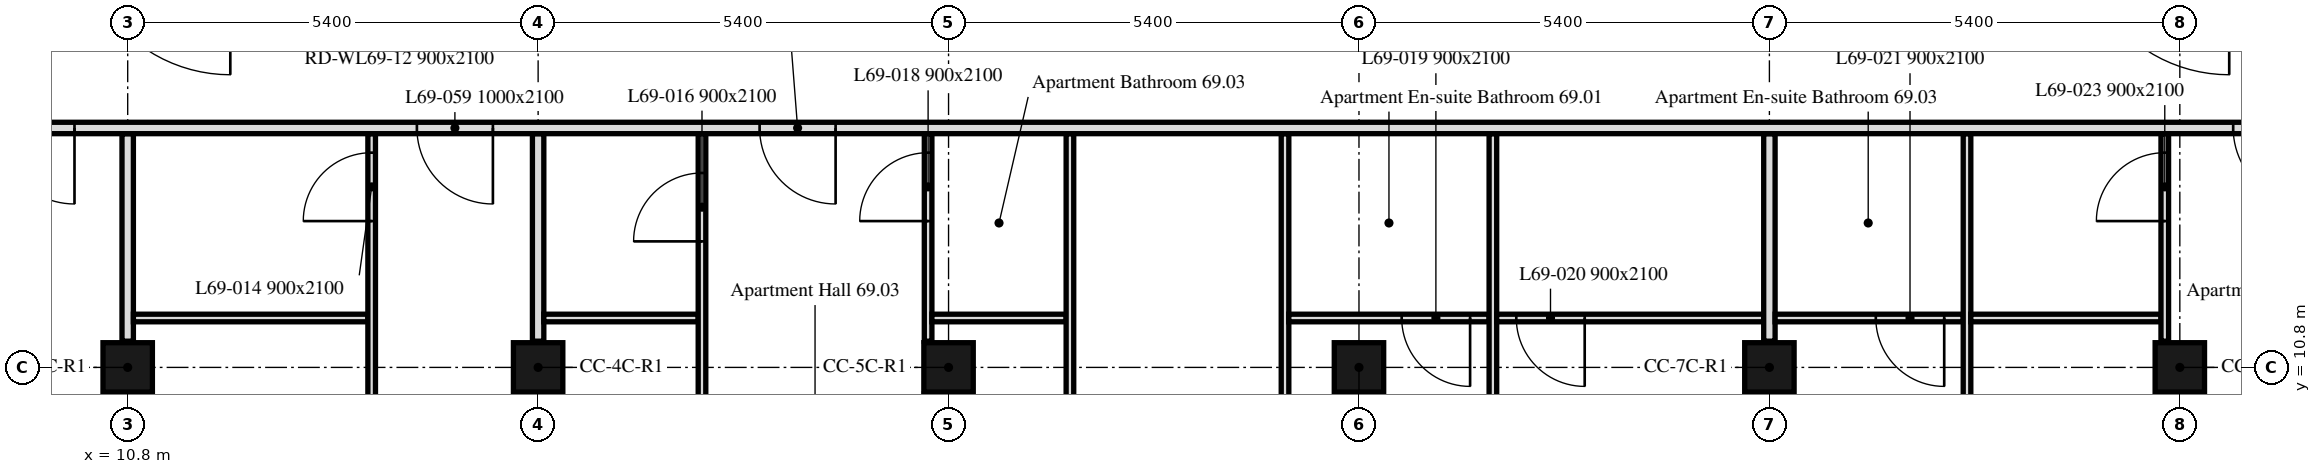
"""IFC4 building model, lengths in metres.
Left out: names, types, materials, properties, quantities, classifications, styles, units other than length and angle.
Written with IfcOpenShell. Run it as: python <this file> out.ifc"""

import sys

from ifc_helpers import new_model, si_unit, direction, frame, frame_2d, origin, origin_2d, place, context, subcontext, project, spatial, rectangle, extrude, element, fill, save


model = new_model("IFC4")
c1 = context("Model", 3, precision=1e-05, world=origin(), true_north=direction((0.0, 1.0)))
c2 = subcontext(c1, "Body", "Model", "MODEL_VIEW")
j1 = project(units=[si_unit("LENGTHUNIT", "METRE"), si_unit("PLANEANGLEUNIT", "RADIAN")], contexts=[c1])
p1 = place(None, origin())
s1 = spatial("IfcSite", under=j1, at=p1, CompositionType="ELEMENT")
p2 = place(p1, origin())
s2 = spatial("IfcBuilding", under=s1, at=p2, CompositionType="ELEMENT")
p3 = place(p2, frame((0.0, 0.0, 281.8)))
s3 = spatial("IfcBuildingStorey", under=s2, at=p3, CompositionType="ELEMENT", Elevation=281.8)
for number, where, z_axis, x_axis in (
    (1, (10.8, 10.8, 0.0), (0.0, 0.0, 1.0), (1.0, 0.0, 0.0)),
    (2, (16.2, 10.8, 0.0), (0.0, 0.0, 1.0), (1.0, 0.0, 0.0)),
    (3, (21.6, 10.8, 0.0), (0.0, 0.0, 1.0), (1.0, 0.0, 0.0)),
    (4, (27.0, 10.8, 0.0), (0.0, 0.0, 1.0), (1.0, 0.0, 0.0)),
    (5, (32.4, 10.8, 0.0), (0.0, 0.0, 1.0), (1.0, 0.0, 0.0)),
    (6, (37.8, 10.8, 0.0), (0.0, 0.0, 1.0), (1.0, 0.0, 0.0)),
):
    element("IfcColumn", number, at=place(p3, frame(where, z_axis=z_axis, x_axis=x_axis)), inside=s3, PredefinedType="COLUMN", context=c2, shape_type="SweptSolid", body=[
        extrude(rectangle(XDim=0.65, YDim=0.65, at=origin_2d()), origin(), (0.0, 0.0, 1.0), 3.0),
    ])
p4 = place(p3, frame((10.8, 5.9, 0.0), z_axis=(0.0, 0.0, 1.0), x_axis=(0.0, 1.0, 0.0)))
e7 = element("IfcWall", 7, at=p4, inside=s3, PredefinedType="PARTITIONING", context=c2, shape_type="SweptSolid", body=[
    extrude(rectangle(XDim=4.555, YDim=0.15, at=frame_2d((2.278, 0.0))), origin(), (0.0, 0.0, 1.0), 3.0),
])
p5 = place(p3, frame((10.8, 11.145, 0.0), z_axis=(0.0, 0.0, 1.0), x_axis=(0.0, 1.0, 0.0)))
e8 = element("IfcWall", 8, at=p5, inside=s3, PredefinedType="PARTITIONING", context=c2, shape_type="SweptSolid", body=[
    extrude(rectangle(XDim=2.73, YDim=0.15, at=frame_2d((1.365, 0.0))), origin(), (0.0, 0.0, 1.0), 3.0),
])
p6 = place(p3, frame((13.96, 11.45, 0.0), z_axis=(0.0, 0.0, 1.0), x_axis=(-1.0, 0.0, 0.0)))
e9 = element("IfcWall", 9, at=p6, inside=s3, PredefinedType="PARTITIONING", context=c2, shape_type="SweptSolid", body=[
    extrude(rectangle(XDim=3.085, YDim=0.1, at=frame_2d((1.542, 0.0))), origin(), (0.0, 0.0, 1.0), 3.0),
])
p7 = place(p3, frame((14.01, 5.9, 0.0), z_axis=(0.0, 0.0, 1.0), x_axis=(0.0, 1.0, 0.0)))
e10 = element("IfcWall", 10, at=p7, inside=s3, PredefinedType="PARTITIONING", context=c2, shape_type="SweptSolid", body=[
    extrude(rectangle(XDim=7.975, YDim=0.1, at=frame_2d((3.988, 0.0))), origin(), (0.0, 0.0, 1.0), 3.0),
])
p8 = place(p7, frame((6.825, 0.0, 0.0)))
e11 = element("IfcOpeningElement", 11, at=p8, cuts=e10, PredefinedType="OPENING", context=c2, shape_type="SweptSolid", body=[
    extrude(rectangle(XDim=0.9, YDim=2.1, at=frame_2d((0.45, 1.05))), frame((0.0, 0.05, 0.0), z_axis=(0.0, -1.0, 0.0), x_axis=(1.0, 0.0, 0.0)), (0.0, 0.0, 1.0), 0.1),
])
p9 = place(p7, frame((2.3, 0.0, 0.0)))
e12 = element("IfcOpeningElement", 12, at=p9, cuts=e10, PredefinedType="OPENING", context=c2, shape_type="SweptSolid", body=[
    extrude(rectangle(XDim=0.9, YDim=2.1, at=frame_2d((0.45, 1.05))), frame((0.0, 0.05, 0.0), z_axis=(0.0, -1.0, 0.0), x_axis=(1.0, 0.0, 0.0)), (0.0, 0.0, 1.0), 0.1),
])
p10 = place(p3, frame((16.2, 5.9, 0.0), z_axis=(0.0, 0.0, 1.0), x_axis=(0.0, 1.0, 0.0)))
e13 = element("IfcWall", 13, at=p10, inside=s3, PredefinedType="PARTITIONING", context=c2, shape_type="SweptSolid", body=[
    extrude(rectangle(XDim=4.555, YDim=0.15, at=frame_2d((2.278, 0.0))), origin(), (0.0, 0.0, 1.0), 2.4),
])
p11 = place(p3, frame((16.2, 11.145, 0.0), z_axis=(0.0, 0.0, 1.0), x_axis=(0.0, 1.0, 0.0)))
e14 = element("IfcWall", 14, at=p11, inside=s3, PredefinedType="PARTITIONING", context=c2, shape_type="SweptSolid", body=[
    extrude(rectangle(XDim=2.73, YDim=0.15, at=frame_2d((1.365, 0.0))), origin(), (0.0, 0.0, 1.0), 2.4),
])
p12 = place(p3, frame((18.306, 11.45, 0.0), z_axis=(0.0, 0.0, 1.0), x_axis=(-1.0, 0.0, 0.0)))
e15 = element("IfcWall", 15, at=p12, inside=s3, PredefinedType="PARTITIONING", context=c2, shape_type="SweptSolid", body=[
    extrude(rectangle(XDim=2.031, YDim=0.1, at=frame_2d((1.016, 0.0))), origin(), (0.0, 0.0, 1.0), 3.0),
])
p13 = place(p3, frame((18.356, 5.9, 0.0), z_axis=(0.0, 0.0, 1.0), x_axis=(0.0, 1.0, 0.0)))
e16 = element("IfcWall", 16, at=p13, inside=s3, PredefinedType="PARTITIONING", context=c2, shape_type="SweptSolid", body=[
    extrude(rectangle(XDim=7.975, YDim=0.1, at=frame_2d((3.988, 0.0))), origin(), (0.0, 0.0, 1.0), 3.0),
])
p14 = place(p13, frame((6.558, 0.0, 0.0)))
e17 = element("IfcOpeningElement", 17, at=p14, cuts=e16, PredefinedType="OPENING", context=c2, shape_type="SweptSolid", body=[
    extrude(rectangle(XDim=0.9, YDim=2.1, at=frame_2d((0.45, 1.05))), frame((0.0, 0.05, 0.0), z_axis=(0.0, -1.0, 0.0), x_axis=(1.0, 0.0, 0.0)), (0.0, 0.0, 1.0), 0.1),
])
p15 = place(p13, frame((2.3, 0.0, 0.0)))
e18 = element("IfcOpeningElement", 18, at=p15, cuts=e16, PredefinedType="OPENING", context=c2, shape_type="SweptSolid", body=[
    extrude(rectangle(XDim=0.9, YDim=2.1, at=frame_2d((0.45, 1.05))), frame((0.0, 0.05, 0.0), z_axis=(0.0, -1.0, 0.0), x_axis=(1.0, 0.0, 0.0)), (0.0, 0.0, 1.0), 0.1),
])
p16 = place(p3, frame((21.331, 5.9, 0.0), z_axis=(0.0, 0.0, 1.0), x_axis=(0.0, 1.0, 0.0)))
e19 = element("IfcWall", 19, at=p16, inside=s3, PredefinedType="PARTITIONING", context=c2, shape_type="SweptSolid", body=[
    extrude(rectangle(XDim=4.555, YDim=0.1, at=frame_2d((2.278, 0.0))), origin(), (0.0, 0.0, 1.0), 3.0),
])
p17 = place(p16, frame((1.787, 0.0, 0.0)))
e20 = element("IfcOpeningElement", 20, at=p17, cuts=e19, PredefinedType="OPENING", context=c2, shape_type="SweptSolid", body=[
    extrude(rectangle(XDim=0.9, YDim=2.1, at=frame_2d((0.45, 1.05))), frame((0.0, 0.05, 0.0), z_axis=(0.0, -1.0, 0.0), x_axis=(1.0, 0.0, 0.0)), (0.0, 0.0, 1.0), 0.1),
])
p18 = place(p3, frame((21.331, 11.145, 0.0), z_axis=(0.0, 0.0, 1.0), x_axis=(0.0, 1.0, 0.0)))
e21 = element("IfcWall", 21, at=p18, inside=s3, PredefinedType="PARTITIONING", context=c2, shape_type="SweptSolid", body=[
    extrude(rectangle(XDim=2.73, YDim=0.1, at=frame_2d((1.365, 0.0))), origin(), (0.0, 0.0, 1.0), 3.0),
])
p19 = place(p18, frame((1.58, 0.0, 0.0)))
e22 = element("IfcOpeningElement", 22, at=p19, cuts=e21, PredefinedType="OPENING", context=c2, shape_type="SweptSolid", body=[
    extrude(rectangle(XDim=0.9, YDim=2.1, at=frame_2d((0.45, 1.05))), frame((0.0, 0.05, 0.0), z_axis=(0.0, -1.0, 0.0), x_axis=(1.0, 0.0, 0.0)), (0.0, 0.0, 1.0), 0.1),
])
p20 = place(p3, frame((23.147, 11.45, 0.0), z_axis=(0.0, 0.0, 1.0), x_axis=(-1.0, 0.0, 0.0)))
e23 = element("IfcWall", 23, at=p20, inside=s3, PredefinedType="PARTITIONING", context=c2, shape_type="SweptSolid", body=[
    extrude(rectangle(XDim=1.766, YDim=0.1, at=frame_2d((0.883, 0.0))), origin(), (0.0, 0.0, 1.0), 2.4),
])
for number, where, z_axis, x_axis in (
    (24, (23.197, 5.9, 0.0), (0.0, 0.0, 1.0), (0.0, 1.0, 0.0)),
    (25, (26.027, 5.9, 0.0), (0.0, 0.0, 1.0), (0.0, 1.0, 0.0)),
):
    element("IfcWall", number, at=place(p3, frame(where, z_axis=z_axis, x_axis=x_axis)), inside=s3, PredefinedType="PARTITIONING", context=c2, shape_type="SweptSolid", body=[
        extrude(rectangle(XDim=7.975, YDim=0.1, at=frame_2d((3.988, 0.0))), origin(), (0.0, 0.0, 1.0), 3.0),
    ])
p21 = place(p3, frame((28.712, 11.45, 0.0), z_axis=(0.0, 0.0, 1.0), x_axis=(-1.0, 0.0, 0.0)))
e26 = element("IfcWall", 26, at=p21, inside=s3, PredefinedType="PARTITIONING", context=c2, shape_type="SweptSolid", body=[
    extrude(rectangle(XDim=2.635, YDim=0.1, at=frame_2d((1.317, 0.0))), origin(), (0.0, 0.0, 1.0), 2.4),
])
p22 = place(p21, frame((0.25, 0.0, 0.0)))
e27 = element("IfcOpeningElement", 27, at=p22, cuts=e26, PredefinedType="OPENING", context=c2, shape_type="SweptSolid", body=[
    extrude(rectangle(XDim=0.9, YDim=2.1, at=frame_2d((0.45, 1.05))), frame((0.0, 0.05, 0.0), z_axis=(0.0, -1.0, 0.0), x_axis=(1.0, 0.0, 0.0)), (0.0, 0.0, 1.0), 0.1),
])
p23 = place(p3, frame((28.762, 5.9, 0.0), z_axis=(0.0, 0.0, 1.0), x_axis=(0.0, 1.0, 0.0)))
e28 = element("IfcWall", 28, at=p23, inside=s3, PredefinedType="PARTITIONING", context=c2, shape_type="SweptSolid", body=[
    extrude(rectangle(XDim=7.975, YDim=0.1, at=frame_2d((3.988, 0.0))), origin(), (0.0, 0.0, 1.0), 3.0),
])
p24 = place(p3, frame((32.4, 5.9, 0.0), z_axis=(0.0, 0.0, 1.0), x_axis=(0.0, 1.0, 0.0)))
e29 = element("IfcWall", 29, at=p24, inside=s3, PredefinedType="PARTITIONING", context=c2, shape_type="SweptSolid", body=[
    extrude(rectangle(XDim=4.555, YDim=0.15, at=frame_2d((2.278, 0.0))), origin(), (0.0, 0.0, 1.0), 2.4),
])
p25 = place(p3, frame((32.325, 11.45, 0.0), z_axis=(0.0, 0.0, 1.0), x_axis=(-1.0, 0.0, 0.0)))
e30 = element("IfcWall", 30, at=p25, inside=s3, PredefinedType="PARTITIONING", context=c2, shape_type="SweptSolid", body=[
    extrude(rectangle(XDim=3.513, YDim=0.1, at=frame_2d((1.756, 0.0))), origin(), (0.0, 0.0, 1.0), 3.0),
])
p26 = place(p25, frame((2.355, 0.0, 0.0)))
e31 = element("IfcOpeningElement", 31, at=p26, cuts=e30, PredefinedType="OPENING", context=c2, shape_type="SweptSolid", body=[
    extrude(rectangle(XDim=0.9, YDim=2.1, at=frame_2d((0.45, 1.05))), frame((0.0, 0.05, 0.0), z_axis=(0.0, -1.0, 0.0), x_axis=(1.0, 0.0, 0.0)), (0.0, 0.0, 1.0), 0.1),
])
p27 = place(p3, frame((32.4, 11.145, 0.0), z_axis=(0.0, 0.0, 1.0), x_axis=(0.0, 1.0, 0.0)))
e32 = element("IfcWall", 32, at=p27, inside=s3, PredefinedType="PARTITIONING", context=c2, shape_type="SweptSolid", body=[
    extrude(rectangle(XDim=2.73, YDim=0.15, at=frame_2d((1.365, 0.0))), origin(), (0.0, 0.0, 1.0), 2.4),
])
p28 = place(p3, frame((34.95, 11.45, 0.0), z_axis=(0.0, 0.0, 1.0), x_axis=(-1.0, 0.0, 0.0)))
e33 = element("IfcWall", 33, at=p28, inside=s3, PredefinedType="PARTITIONING", context=c2, shape_type="SweptSolid", body=[
    extrude(rectangle(XDim=2.475, YDim=0.1, at=frame_2d((1.237, 0.0))), origin(), (0.0, 0.0, 1.0), 3.0),
])
p29 = place(p28, frame((0.25, 0.0, 0.0)))
e34 = element("IfcOpeningElement", 34, at=p29, cuts=e33, PredefinedType="OPENING", context=c2, shape_type="SweptSolid", body=[
    extrude(rectangle(XDim=0.9, YDim=2.1, at=frame_2d((0.45, 1.05))), frame((0.0, 0.05, 0.0), z_axis=(0.0, -1.0, 0.0), x_axis=(1.0, 0.0, 0.0)), (0.0, 0.0, 1.0), 0.1),
])
p30 = place(p3, frame((35.0, 5.9, 0.0), z_axis=(0.0, 0.0, 1.0), x_axis=(0.0, 1.0, 0.0)))
e35 = element("IfcWall", 35, at=p30, inside=s3, PredefinedType="PARTITIONING", context=c2, shape_type="SweptSolid", body=[
    extrude(rectangle(XDim=7.975, YDim=0.1, at=frame_2d((3.988, 0.0))), origin(), (0.0, 0.0, 1.0), 2.4),
])
p31 = place(p3, frame((37.602, 5.9, 0.0), z_axis=(0.0, 0.0, 1.0), x_axis=(0.0, 1.0, 0.0)))
e36 = element("IfcWall", 36, at=p31, inside=s3, PredefinedType="PARTITIONING", context=c2, shape_type="SweptSolid", body=[
    extrude(rectangle(XDim=4.555, YDim=0.1, at=frame_2d((2.278, 0.0))), origin(), (0.0, 0.0, 1.0), 2.4),
])
p32 = place(p31, frame((1.787, 0.0, 0.0)))
e37 = element("IfcOpeningElement", 37, at=p32, cuts=e36, PredefinedType="OPENING", context=c2, shape_type="SweptSolid", body=[
    extrude(rectangle(XDim=0.9, YDim=2.1, at=frame_2d((0.45, 1.05))), frame((0.0, 0.05, 0.0), z_axis=(0.0, -1.0, 0.0), x_axis=(1.0, 0.0, 0.0)), (0.0, 0.0, 1.0), 0.1),
])
p33 = place(p3, frame((37.552, 11.45, 0.0), z_axis=(0.0, 0.0, 1.0), x_axis=(-1.0, 0.0, 0.0)))
e38 = element("IfcWall", 38, at=p33, inside=s3, PredefinedType="PARTITIONING", context=c2, shape_type="SweptSolid", body=[
    extrude(rectangle(XDim=2.502, YDim=0.1, at=frame_2d((1.251, 0.0))), origin(), (0.0, 0.0, 1.0), 3.0),
])
p34 = place(p3, frame((37.602, 11.145, 0.0), z_axis=(0.0, 0.0, 1.0), x_axis=(0.0, 1.0, 0.0)))
e39 = element("IfcWall", 39, at=p34, inside=s3, PredefinedType="PARTITIONING", context=c2, shape_type="SweptSolid", body=[
    extrude(rectangle(XDim=2.73, YDim=0.1, at=frame_2d((1.365, 0.0))), origin(), (0.0, 0.0, 1.0), 2.4),
])
p35 = place(p34, frame((1.58, 0.0, 0.0)))
e40 = element("IfcOpeningElement", 40, at=p35, cuts=e39, PredefinedType="OPENING", context=c2, shape_type="SweptSolid", body=[
    extrude(rectangle(XDim=0.9, YDim=2.1, at=frame_2d((0.45, 1.05))), frame((0.0, 0.05, 0.0), z_axis=(0.0, -1.0, 0.0), x_axis=(1.0, 0.0, 0.0)), (0.0, 0.0, 1.0), 0.1),
])
p36 = place(p3, frame((47.849, 13.95, 0.0), z_axis=(0.0, 0.0, 1.0), x_axis=(-1.0, 0.0, 0.0)))
e41 = element("IfcWall", 41, at=p36, inside=s3, PredefinedType="PARTITIONING", context=c2, shape_type="SweptSolid", body=[
    extrude(rectangle(XDim=41.698, YDim=0.15, at=frame_2d((20.849, 0.0))), origin(), (0.0, 0.0, 1.0), 2.4),
])
p37 = place(p36, frame((37.749, 0.0, 0.0)))
e42 = element("IfcOpeningElement", 42, at=p37, cuts=e41, PredefinedType="OPENING", context=c2, shape_type="SweptSolid", body=[
    extrude(rectangle(XDim=1.0, YDim=2.1, at=frame_2d((0.5, 1.05))), frame((0.0, 0.075, 0.0), z_axis=(0.0, -1.0, 0.0), x_axis=(1.0, 0.0, 0.0)), (0.0, 0.0, 1.0), 0.15),
])
p38 = place(p36, frame((32.244, 0.0, 0.0)))
e43 = element("IfcOpeningElement", 43, at=p38, cuts=e41, PredefinedType="OPENING", context=c2, shape_type="SweptSolid", body=[
    extrude(rectangle(XDim=1.0, YDim=2.1, at=frame_2d((0.5, 1.05))), frame((0.0, 0.075, 0.0), z_axis=(0.0, -1.0, 0.0), x_axis=(1.0, 0.0, 0.0)), (0.0, 0.0, 1.0), 0.15),
])
p39 = place(p36, frame((27.735, 0.0, 0.0)))
e44 = element("IfcOpeningElement", 44, at=p39, cuts=e41, PredefinedType="OPENING", context=c2, shape_type="SweptSolid", body=[
    extrude(rectangle(XDim=1.0, YDim=2.1, at=frame_2d((0.5, 1.05))), frame((0.0, 0.075, 0.0), z_axis=(0.0, -1.0, 0.0), x_axis=(1.0, 0.0, 0.0)), (0.0, 0.0, 1.0), 0.15),
])
p40 = place(p36, frame((8.347, 0.0, 0.0)))
e45 = element("IfcOpeningElement", 45, at=p40, cuts=e41, PredefinedType="OPENING", context=c2, shape_type="SweptSolid", body=[
    extrude(rectangle(XDim=1.0, YDim=2.1, at=frame_2d((0.5, 1.05))), frame((0.0, 0.075, 0.0), z_axis=(0.0, -1.0, 0.0), x_axis=(1.0, 0.0, 0.0)), (0.0, 0.0, 1.0), 0.15),
])
p41 = place(p8, origin())
e46 = element("IfcDoor", 46, at=p41, inside=s3, OperationType="SINGLE_SWING_LEFT", PredefinedType="DOOR", context=c2, shape_type="SweptSolid", body=[
    extrude(rectangle(XDim=0.9, YDim=2.1, at=frame_2d((0.45, 1.05))), frame((0.0, 0.025, 0.0), z_axis=(0.0, -1.0, 0.0), x_axis=(1.0, 0.0, 0.0)), (0.0, 0.0, 1.0), 0.05),
])
fill(e11, e46)
p42 = place(p14, origin())
e47 = element("IfcDoor", 47, at=p42, inside=s3, OperationType="SINGLE_SWING_RIGHT", PredefinedType="DOOR", context=c2, shape_type="SweptSolid", body=[
    extrude(rectangle(XDim=0.9, YDim=2.1, at=frame_2d((0.45, 1.05))), frame((0.0, 0.025, 0.0), z_axis=(0.0, -1.0, 0.0), x_axis=(1.0, 0.0, 0.0)), (0.0, 0.0, 1.0), 0.05),
])
fill(e17, e47)
p43 = place(p19, origin())
e48 = element("IfcDoor", 48, at=p43, inside=s3, OperationType="SINGLE_SWING_LEFT", PredefinedType="DOOR", context=c2, shape_type="SweptSolid", body=[
    extrude(rectangle(XDim=0.9, YDim=2.1, at=frame_2d((0.45, 1.05))), frame((0.0, 0.025, 0.0), z_axis=(0.0, -1.0, 0.0), x_axis=(1.0, 0.0, 0.0)), (0.0, 0.0, 1.0), 0.05),
])
fill(e22, e48)
p44 = place(p22, origin())
e49 = element("IfcDoor", 49, at=p44, inside=s3, OperationType="SINGLE_SWING_RIGHT", PredefinedType="DOOR", context=c2, shape_type="SweptSolid", body=[
    extrude(rectangle(XDim=0.9, YDim=2.1, at=frame_2d((0.45, 1.05))), frame((0.0, 0.025, 0.0), z_axis=(0.0, -1.0, 0.0), x_axis=(1.0, 0.0, 0.0)), (0.0, 0.0, 1.0), 0.05),
])
fill(e27, e49)
p45 = place(p26, origin())
e50 = element("IfcDoor", 50, at=p45, inside=s3, OperationType="SINGLE_SWING_RIGHT", PredefinedType="DOOR", context=c2, shape_type="SweptSolid", body=[
    extrude(rectangle(XDim=0.9, YDim=2.1, at=frame_2d((0.45, 1.05))), frame((0.0, 0.025, 0.0), z_axis=(0.0, -1.0, 0.0), x_axis=(1.0, 0.0, 0.0)), (0.0, 0.0, 1.0), 0.05),
])
fill(e31, e50)
p46 = place(p29, origin())
e51 = element("IfcDoor", 51, at=p46, inside=s3, OperationType="SINGLE_SWING_LEFT", PredefinedType="DOOR", context=c2, shape_type="SweptSolid", body=[
    extrude(rectangle(XDim=0.9, YDim=2.1, at=frame_2d((0.45, 1.05))), frame((0.0, 0.025, 0.0), z_axis=(0.0, -1.0, 0.0), x_axis=(1.0, 0.0, 0.0)), (0.0, 0.0, 1.0), 0.05),
])
fill(e34, e51)
p47 = place(p35, origin())
e52 = element("IfcDoor", 52, at=p47, inside=s3, OperationType="SINGLE_SWING_LEFT", PredefinedType="DOOR", context=c2, shape_type="SweptSolid", body=[
    extrude(rectangle(XDim=0.9, YDim=2.1, at=frame_2d((0.45, 1.05))), frame((0.0, 0.025, 0.0), z_axis=(0.0, -1.0, 0.0), x_axis=(1.0, 0.0, 0.0)), (0.0, 0.0, 1.0), 0.05),
])
fill(e40, e52)
p48 = place(p37, origin())
e53 = element("IfcDoor", 53, at=p48, inside=s3, OperationType="SINGLE_SWING_LEFT", PredefinedType="DOOR", context=c2, shape_type="SweptSolid", body=[
    extrude(rectangle(XDim=1.0, YDim=2.1, at=frame_2d((0.5, 1.05))), frame((0.0, 0.025, 0.0), z_axis=(0.0, -1.0, 0.0), x_axis=(1.0, 0.0, 0.0)), (0.0, 0.0, 1.0), 0.05),
])
fill(e42, e53)
p49 = place(p38, origin())
e54 = element("IfcDoor", 54, at=p49, inside=s3, OperationType="SINGLE_SWING_LEFT", PredefinedType="DOOR", context=c2, shape_type="SweptSolid", body=[
    extrude(rectangle(XDim=1.0, YDim=2.1, at=frame_2d((0.5, 1.05))), frame((0.0, 0.025, 0.0), z_axis=(0.0, -1.0, 0.0), x_axis=(1.0, 0.0, 0.0)), (0.0, 0.0, 1.0), 0.05),
])
fill(e43, e54)
p50 = place(p39, origin())
e55 = element("IfcDoor", 55, at=p50, inside=s3, OperationType="SINGLE_SWING_RIGHT", PredefinedType="DOOR", context=c2, shape_type="SweptSolid", body=[
    extrude(rectangle(XDim=1.0, YDim=2.1, at=frame_2d((0.5, 1.05))), frame((0.0, 0.025, 0.0), z_axis=(0.0, -1.0, 0.0), x_axis=(1.0, 0.0, 0.0)), (0.0, 0.0, 1.0), 0.05),
])
fill(e44, e55)
p51 = place(p40, origin())
e56 = element("IfcDoor", 56, at=p51, inside=s3, OperationType="SINGLE_SWING_LEFT", PredefinedType="DOOR", context=c2, shape_type="SweptSolid", body=[
    extrude(rectangle(XDim=1.0, YDim=2.1, at=frame_2d((0.5, 1.05))), frame((0.0, 0.025, 0.0), z_axis=(0.0, -1.0, 0.0), x_axis=(1.0, 0.0, 0.0)), (0.0, 0.0, 1.0), 0.05),
])
fill(e45, e56)
save(model, sys.argv[1])
